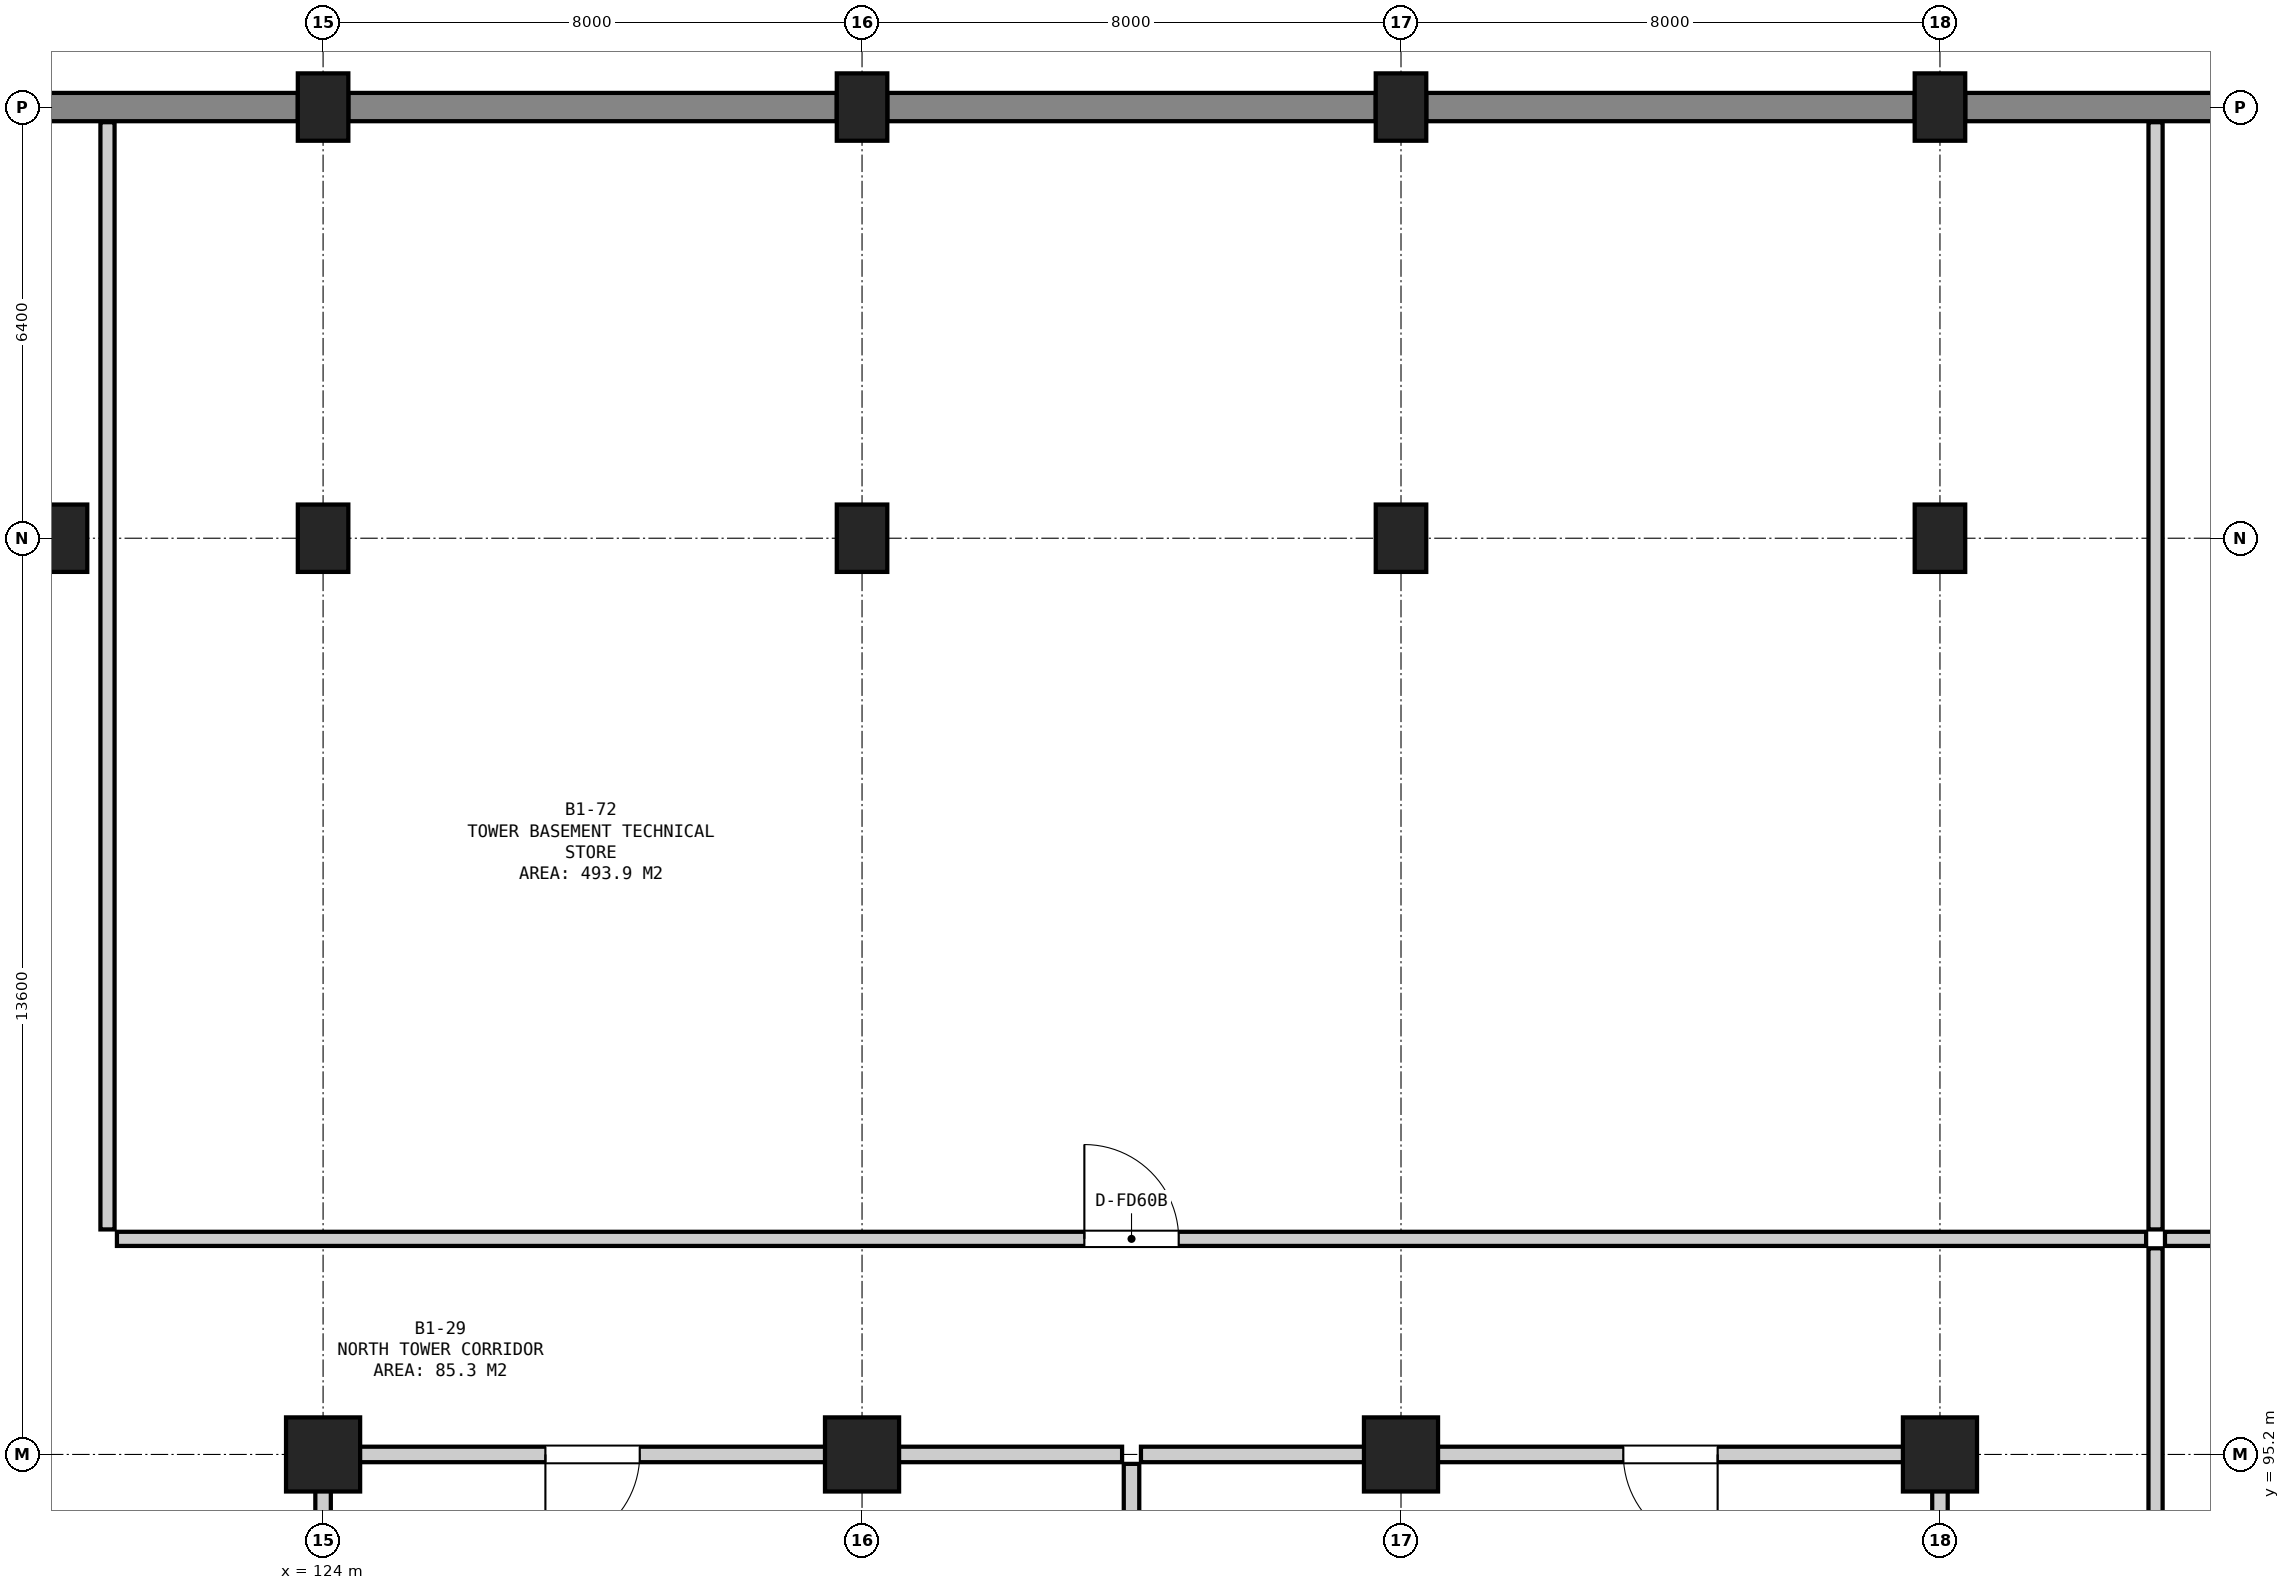
"""IFC4 building model, lengths in metres.
Left out: names, types, materials, properties, quantities, classifications, styles, units other than length and angle.
Written with IfcOpenShell. Run it as: python <this file> out.ifc"""

import sys

from ifc_helpers import new_model, si_unit, direction, frame, frame_2d, origin, origin_2d, place, context, subcontext, project, spatial, rectangle, circle, extrude, element, fill, save


model = new_model("IFC4")
c1 = context("Model", 3, precision=1e-05, world=origin(), true_north=direction((0.0, 1.0)))
c2 = subcontext(c1, "Body", "Model", "MODEL_VIEW")
j1 = project(units=[si_unit("LENGTHUNIT", "METRE"), si_unit("PLANEANGLEUNIT", "RADIAN")], contexts=[c1])
p1 = place(None, origin())
s1 = spatial("IfcSite", under=j1, at=p1, CompositionType="ELEMENT")
p2 = place(p1, origin())
s2 = spatial("IfcBuilding", under=s1, at=p2, CompositionType="ELEMENT")
p3 = place(p2, frame((0.0, 0.0, -4.5)))
s3 = spatial("IfcBuildingStorey", under=s2, at=p3, CompositionType="ELEMENT", Elevation=-4.5)
p4 = place(p3, frame((120.0, 108.8, 0.0), z_axis=(0.0, 0.0, 1.0), x_axis=(1.0, 0.0, 0.0)))
e1 = element("IfcColumn", 1, at=p4, inside=s3, PredefinedType="COLUMN", context=c2, shape_type="SweptSolid", body=[
    extrude(circle(Radius=0.5, at=origin_2d()), origin(), (0.0, 0.0, 1.0), 4.5),
])
p5 = place(p3, frame((124.0, 95.2, 0.0), z_axis=(0.0, 0.0, 1.0), x_axis=(1.0, 0.0, 0.0)))
e2 = element("IfcColumn", 2, at=p5, inside=s3, PredefinedType="COLUMN", context=c2, shape_type="SweptSolid", body=[
    extrude(rectangle(XDim=1.1, YDim=1.1, at=origin_2d()), origin(), (0.0, 0.0, 1.0), 4.5),
])
for number, where, z_axis, x_axis in (
    (3, (124.0, 108.8, 0.0), (0.0, 0.0, 1.0), (1.0, 0.0, 0.0)),
    (4, (124.0, 115.2, 0.0), (0.0, 0.0, 1.0), (1.0, 0.0, 0.0)),
):
    element("IfcColumn", number, at=place(p3, frame(where, z_axis=z_axis, x_axis=x_axis)), inside=s3, PredefinedType="COLUMN", context=c2, shape_type="SweptSolid", body=[
        extrude(rectangle(XDim=0.75, YDim=1.0, at=origin_2d()), origin(), (0.0, 0.0, 1.0), 4.5),
    ])
p6 = place(p3, frame((132.0, 95.2, 0.0), z_axis=(0.0, 0.0, 1.0), x_axis=(1.0, 0.0, 0.0)))
e5 = element("IfcColumn", 5, at=p6, inside=s3, PredefinedType="COLUMN", context=c2, shape_type="SweptSolid", body=[
    extrude(rectangle(XDim=1.1, YDim=1.1, at=origin_2d()), origin(), (0.0, 0.0, 1.0), 4.5),
])
for number, where, z_axis, x_axis in (
    (6, (132.0, 108.8, 0.0), (0.0, 0.0, 1.0), (1.0, 0.0, 0.0)),
    (7, (132.0, 115.2, 0.0), (0.0, 0.0, 1.0), (1.0, 0.0, 0.0)),
):
    element("IfcColumn", number, at=place(p3, frame(where, z_axis=z_axis, x_axis=x_axis)), inside=s3, PredefinedType="COLUMN", context=c2, shape_type="SweptSolid", body=[
        extrude(rectangle(XDim=0.75, YDim=1.0, at=origin_2d()), origin(), (0.0, 0.0, 1.0), 4.5),
    ])
p7 = place(p3, frame((140.0, 95.2, 0.0), z_axis=(0.0, 0.0, 1.0), x_axis=(1.0, 0.0, 0.0)))
e8 = element("IfcColumn", 8, at=p7, inside=s3, PredefinedType="COLUMN", context=c2, shape_type="SweptSolid", body=[
    extrude(rectangle(XDim=1.1, YDim=1.1, at=origin_2d()), origin(), (0.0, 0.0, 1.0), 4.5),
])
for number, where, z_axis, x_axis in (
    (9, (140.0, 108.8, 0.0), (0.0, 0.0, 1.0), (1.0, 0.0, 0.0)),
    (10, (140.0, 115.2, 0.0), (0.0, 0.0, 1.0), (1.0, 0.0, 0.0)),
):
    element("IfcColumn", number, at=place(p3, frame(where, z_axis=z_axis, x_axis=x_axis)), inside=s3, PredefinedType="COLUMN", context=c2, shape_type="SweptSolid", body=[
        extrude(rectangle(XDim=0.75, YDim=1.0, at=origin_2d()), origin(), (0.0, 0.0, 1.0), 4.5),
    ])
p8 = place(p3, frame((148.0, 95.2, 0.0), z_axis=(0.0, 0.0, 1.0), x_axis=(1.0, 0.0, 0.0)))
e11 = element("IfcColumn", 11, at=p8, inside=s3, PredefinedType="COLUMN", context=c2, shape_type="SweptSolid", body=[
    extrude(rectangle(XDim=1.1, YDim=1.1, at=origin_2d()), origin(), (0.0, 0.0, 1.0), 4.5),
])
for number, where, z_axis, x_axis in (
    (12, (148.0, 108.8, 0.0), (0.0, 0.0, 1.0), (1.0, 0.0, 0.0)),
    (13, (148.0, 115.2, 0.0), (0.0, 0.0, 1.0), (1.0, 0.0, 0.0)),
):
    element("IfcColumn", number, at=place(p3, frame(where, z_axis=z_axis, x_axis=x_axis)), inside=s3, PredefinedType="COLUMN", context=c2, shape_type="SweptSolid", body=[
        extrude(rectangle(XDim=0.75, YDim=1.0, at=origin_2d()), origin(), (0.0, 0.0, 1.0), 4.5),
    ])
p9 = place(p3, frame((161.225, 115.2, 0.0), z_axis=(0.0, 0.0, 1.0), x_axis=(-1.0, 0.0, 0.0)))
e14 = element("IfcWall", 14, at=p9, inside=s3, PredefinedType="SOLIDWALL", context=c2, shape_type="SweptSolid", body=[
    extrude(rectangle(XDim=12.85, YDim=0.42, at=frame_2d((6.425, 0.0))), origin(), (0.0, 0.0, 1.0), 4.08),
])
for number, where, z_axis, x_axis in (
    (15, (147.625, 115.2, 0.0), (0.0, 0.0, 1.0), (-1.0, 0.0, 0.0)),
    (16, (139.625, 115.2, 0.0), (0.0, 0.0, 1.0), (-1.0, 0.0, 0.0)),
    (17, (131.625, 115.2, 0.0), (0.0, 0.0, 1.0), (-1.0, 0.0, 0.0)),
):
    element("IfcWall", number, at=place(p3, frame(where, z_axis=z_axis, x_axis=x_axis)), inside=s3, PredefinedType="SOLIDWALL", context=c2, shape_type="SweptSolid", body=[
        extrude(rectangle(XDim=7.25, YDim=0.42, at=frame_2d((3.625, 0.0))), origin(), (0.0, 0.0, 1.0), 4.08),
    ])
p10 = place(p3, frame((123.625, 115.2, 0.0), z_axis=(0.0, 0.0, 1.0), x_axis=(-1.0, 0.0, 0.0)))
e18 = element("IfcWall", 18, at=p10, inside=s3, PredefinedType="SOLIDWALL", context=c2, shape_type="SweptSolid", body=[
    extrude(rectangle(XDim=6.45, YDim=0.42, at=frame_2d((3.225, 0.0))), origin(), (0.0, 0.0, 1.0), 4.08),
])
p11 = place(p3, frame((124.14, 95.2, 0.0), z_axis=(0.0, 0.0, 1.0), x_axis=(1.0, 0.0, 0.0)))
e19 = element("IfcWall", 19, at=p11, inside=s3, PredefinedType="SOLIDWALL", context=c2, shape_type="SweptSolid", body=[
    extrude(rectangle(XDim=11.72, YDim=0.23, at=frame_2d((5.86, 0.0))), origin(), (0.0, 0.0, 1.0), 3.475),
])
p12 = place(p11, frame((3.16, 0.0, 0.0)))
e20 = element("IfcOpeningElement", 20, at=p12, cuts=e19, PredefinedType="OPENING", context=c2, shape_type="SweptSolid", body=[
    extrude(rectangle(XDim=1.4, YDim=2.2, at=frame_2d((0.7, 1.1))), frame((0.0, 0.127, 0.0), z_axis=(0.0, -1.0, 0.0), x_axis=(1.0, 0.0, 0.0)), (0.0, 0.0, 1.0), 0.254),
])
p13 = place(p3, frame((124.0, 91.54, 0.0), z_axis=(0.0, 0.0, 1.0), x_axis=(0.0, 1.0, 0.0)))
e21 = element("IfcWall", 21, at=p13, inside=s3, PredefinedType="SOLIDWALL", context=c2, shape_type="SweptSolid", body=[
    extrude(rectangle(XDim=3.52, YDim=0.23, at=frame_2d((1.76, 0.0))), origin(), (0.0, 0.0, 1.0), 3.375),
])
p14 = place(p3, frame((136.0, 91.54, 0.0), z_axis=(0.0, 0.0, 1.0), x_axis=(0.0, 1.0, 0.0)))
e22 = element("IfcWall", 22, at=p14, inside=s3, PredefinedType="SOLIDWALL", context=c2, shape_type="SweptSolid", body=[
    extrude(rectangle(XDim=3.52, YDim=0.23, at=frame_2d((1.76, 0.0))), origin(), (0.0, 0.0, 1.0), 4.08),
])
p15 = place(p3, frame((136.14, 95.2, 0.0), z_axis=(0.0, 0.0, 1.0), x_axis=(1.0, 0.0, 0.0)))
e23 = element("IfcWall", 23, at=p15, inside=s3, PredefinedType="SOLIDWALL", context=c2, shape_type="SweptSolid", body=[
    extrude(rectangle(XDim=11.72, YDim=0.23, at=frame_2d((5.86, 0.0))), origin(), (0.0, 0.0, 1.0), 3.475),
])
p16 = place(p15, frame((7.16, 0.0, 0.0)))
e24 = element("IfcOpeningElement", 24, at=p16, cuts=e23, PredefinedType="OPENING", context=c2, shape_type="SweptSolid", body=[
    extrude(rectangle(XDim=1.4, YDim=2.2, at=frame_2d((0.7, 1.1))), frame((0.0, 0.127, 0.0), z_axis=(0.0, -1.0, 0.0), x_axis=(1.0, 0.0, 0.0)), (0.0, 0.0, 1.0), 0.254),
])
p17 = place(p3, frame((148.0, 91.54, 0.0), z_axis=(0.0, 0.0, 1.0), x_axis=(0.0, 1.0, 0.0)))
e25 = element("IfcWall", 25, at=p17, inside=s3, PredefinedType="SOLIDWALL", context=c2, shape_type="SweptSolid", body=[
    extrude(rectangle(XDim=3.52, YDim=0.23, at=frame_2d((1.76, 0.0))), origin(), (0.0, 0.0, 1.0), 3.475),
])
p18 = place(p3, frame((151.34, 98.4, 0.0), z_axis=(0.0, 0.0, 1.0), x_axis=(1.0, 0.0, 0.0)))
e26 = element("IfcWall", 26, at=p18, inside=s3, PredefinedType="SOLIDWALL", context=c2, shape_type="SweptSolid", body=[
    extrude(rectangle(XDim=16.435, YDim=0.21, at=frame_2d((8.217, 0.0))), origin(), (0.0, 0.0, 1.0), 4.08),
])
p19 = place(p3, frame((151.2, 65.74, 0.0), z_axis=(0.0, 0.0, 1.0), x_axis=(0.0, 1.0, 0.0)))
e27 = element("IfcWall", 27, at=p19, inside=s3, PredefinedType="SOLIDWALL", context=c2, shape_type="SweptSolid", body=[
    extrude(rectangle(XDim=32.52, YDim=0.21, at=frame_2d((16.26, 0.0))), origin(), (0.0, 0.0, 1.0), 4.08),
])
p20 = place(p19, frame((16.76, 0.0, 0.0)))
e28 = element("IfcOpeningElement", 28, at=p20, cuts=e27, PredefinedType="OPENING", context=c2, shape_type="SweptSolid", body=[
    extrude(rectangle(XDim=1.4, YDim=2.2, at=frame_2d((0.7, 1.1))), frame((0.0, 0.117, 0.0), z_axis=(0.0, -1.0, 0.0), x_axis=(1.0, 0.0, 0.0)), (0.0, 0.0, 1.0), 0.234),
])
p21 = place(p3, frame((120.94, 98.4, 0.0), z_axis=(0.0, 0.0, 1.0), x_axis=(1.0, 0.0, 0.0)))
e29 = element("IfcWall", 29, at=p21, inside=s3, PredefinedType="SOLIDWALL", context=c2, shape_type="SweptSolid", body=[
    extrude(rectangle(XDim=30.12, YDim=0.21, at=frame_2d((15.06, 0.0))), origin(), (0.0, 0.0, 1.0), 4.08),
])
p22 = place(p21, frame((14.36, 0.0, 0.0)))
e30 = element("IfcOpeningElement", 30, at=p22, cuts=e29, PredefinedType="OPENING", context=c2, shape_type="SweptSolid", body=[
    extrude(rectangle(XDim=1.4, YDim=2.2, at=frame_2d((0.7, 1.1))), frame((0.0, 0.117, 0.0), z_axis=(0.0, -1.0, 0.0), x_axis=(1.0, 0.0, 0.0)), (0.0, 0.0, 1.0), 0.234),
])
for number, where, z_axis, x_axis in (
    (31, (120.8, 98.54, 0.0), (0.0, 0.0, 1.0), (0.0, 1.0, 0.0)),
    (32, (151.2, 98.54, 0.0), (0.0, 0.0, 1.0), (0.0, 1.0, 0.0)),
):
    element("IfcWall", number, at=place(p3, frame(where, z_axis=z_axis, x_axis=x_axis)), inside=s3, PredefinedType="SOLIDWALL", context=c2, shape_type="SweptSolid", body=[
        extrude(rectangle(XDim=16.435, YDim=0.21, at=frame_2d((8.218, 0.0))), origin(), (0.0, 0.0, 1.0), 4.08),
    ])
p23 = place(p12, frame((1.4, 0.0, 0.0), z_axis=(0.0, 0.0, 1.0), x_axis=(-1.0, 0.0, 0.0)))
e33 = element("IfcDoor", 33, at=p23, inside=s3, OperationType="SINGLE_SWING_RIGHT", PredefinedType="DOOR", context=c2, shape_type="SweptSolid", body=[
    extrude(rectangle(XDim=1.4, YDim=2.2, at=frame_2d((0.7, 1.1))), frame((0.0, 0.025, 0.0), z_axis=(0.0, -1.0, 0.0), x_axis=(1.0, 0.0, 0.0)), (0.0, 0.0, 1.0), 0.05),
])
fill(e20, e33)
p24 = place(p16, frame((1.4, 0.0, 0.0), z_axis=(0.0, 0.0, 1.0), x_axis=(-1.0, 0.0, 0.0)))
e34 = element("IfcDoor", 34, at=p24, inside=s3, OperationType="SINGLE_SWING_LEFT", PredefinedType="DOOR", context=c2, shape_type="SweptSolid", body=[
    extrude(rectangle(XDim=1.4, YDim=2.2, at=frame_2d((0.7, 1.1))), frame((0.0, 0.025, 0.0), z_axis=(0.0, -1.0, 0.0), x_axis=(1.0, 0.0, 0.0)), (0.0, 0.0, 1.0), 0.05),
])
fill(e24, e34)
p25 = place(p22, origin())
e35 = element("IfcDoor", 35, at=p25, inside=s3, OperationType="SINGLE_SWING_LEFT", PredefinedType="DOOR", context=c2, shape_type="SweptSolid", body=[
    extrude(rectangle(XDim=1.4, YDim=2.2, at=frame_2d((0.7, 1.1))), frame((0.0, 0.025, 0.0), z_axis=(0.0, -1.0, 0.0), x_axis=(1.0, 0.0, 0.0)), (0.0, 0.0, 1.0), 0.05),
])
fill(e30, e35)
save(model, sys.argv[1])
